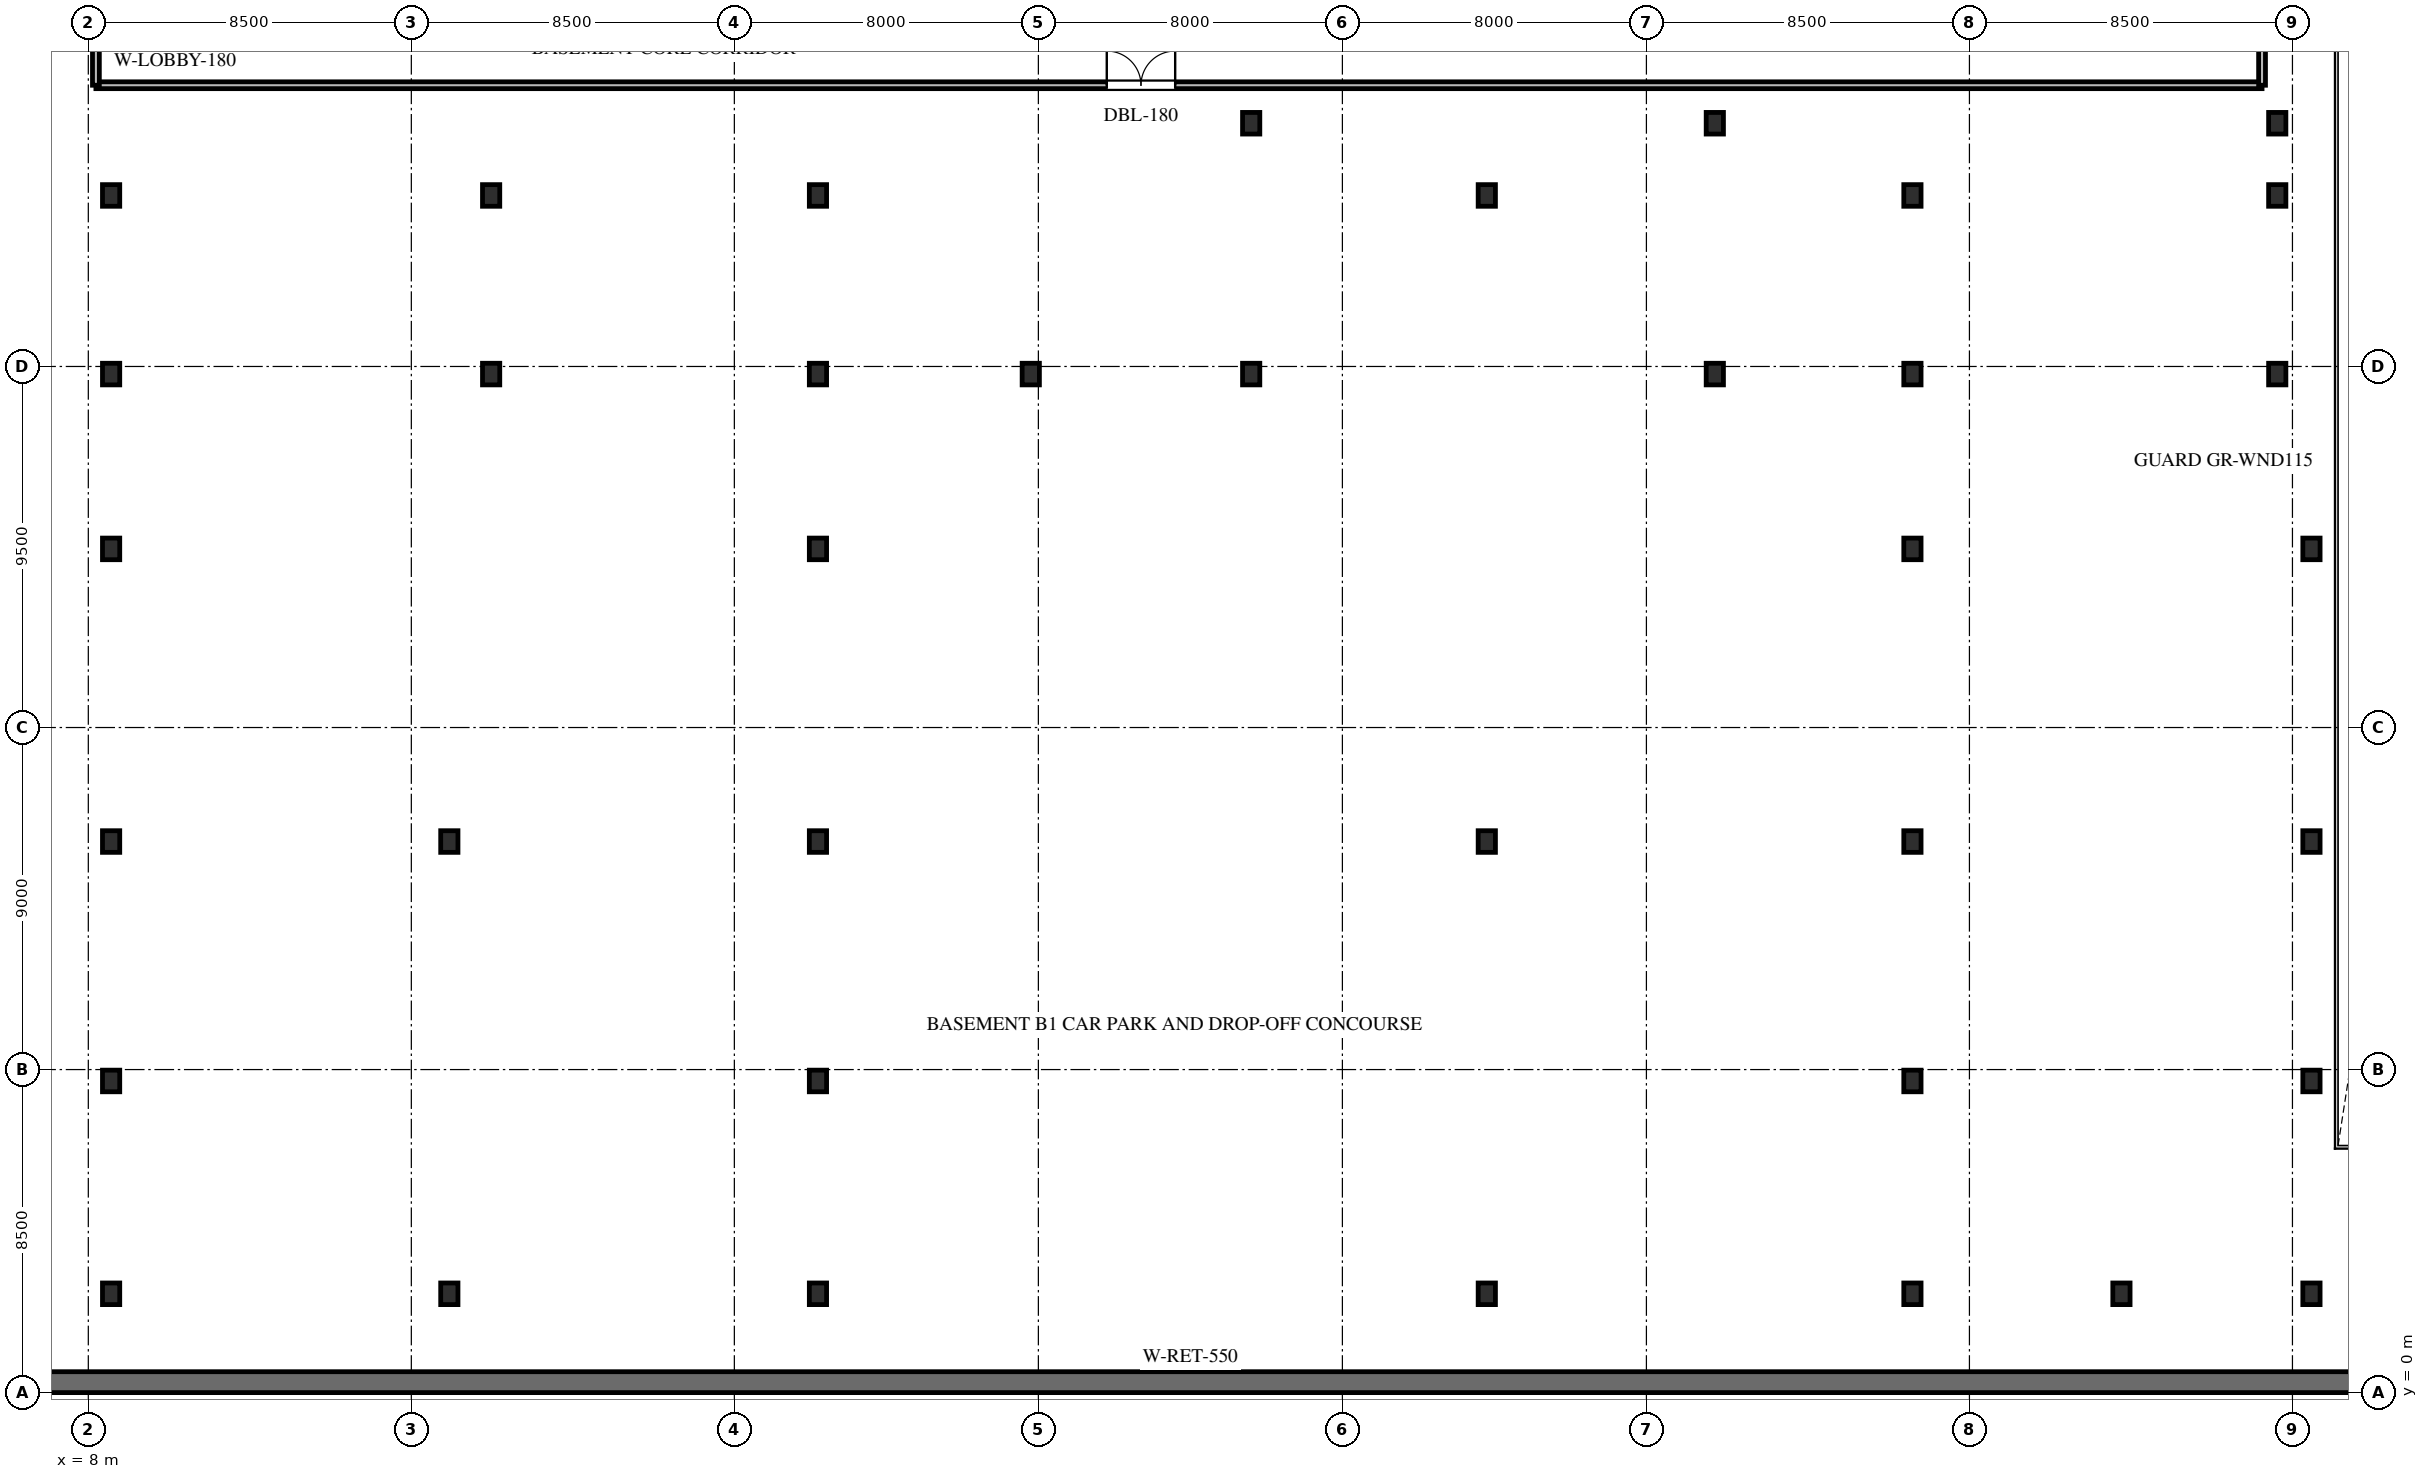
"""IFC4 building model, lengths in metres.
Left out: names, types, materials, properties, quantities, classifications, styles, units other than length and angle.
Written with IfcOpenShell. Run it as: python <this file> out.ifc"""

import sys

from ifc_helpers import new_model, si_unit, direction, frame, frame_2d, origin, origin_2d, place, context, subcontext, project, spatial, rectangle, i_section, extrude, element, fill, save


model = new_model("IFC4")
c1 = context("Model", 3, precision=1e-05, world=origin(), true_north=direction((0.0, 1.0)))
c2 = subcontext(c1, "Body", "Model", "MODEL_VIEW")
j1 = project(units=[si_unit("LENGTHUNIT", "METRE"), si_unit("PLANEANGLEUNIT", "RADIAN")], contexts=[c1])
p1 = place(None, origin())
s1 = spatial("IfcSite", under=j1, at=p1, CompositionType="ELEMENT")
p2 = place(p1, origin())
s2 = spatial("IfcBuilding", under=s1, at=p2, CompositionType="ELEMENT")
p3 = place(p2, frame((0.0, 0.0, -4.2)))
s3 = spatial("IfcBuildingStorey", under=s2, at=p3, CompositionType="ELEMENT", Elevation=-4.2)
p4 = place(p3, frame((0.0, 0.275, 0.0), z_axis=(0.0, 0.0, 1.0), x_axis=(1.0, 0.0, 0.0)))
e1 = element("IfcWall", 1, at=p4, inside=s3, PredefinedType="SOLIDWALL", context=c2, shape_type="SweptSolid", body=[
    extrude(rectangle(XDim=74.0, YDim=0.55, at=frame_2d((37.0, 0.0))), origin(), (0.0, 0.0, 1.0), 4.2),
])
for number, where, z_axis, x_axis in (
    (2, (8.6, 2.6, 0.0), (0.0, 0.0, 1.0), (1.0, 0.0, 0.0)),
    (3, (17.5, 2.6, 0.0), (0.0, 0.0, 1.0), (1.0, 0.0, 0.0)),
    (4, (27.2, 2.6, 0.0), (0.0, 0.0, 1.0), (1.0, 0.0, 0.0)),
    (5, (44.8, 2.6, 0.0), (0.0, 0.0, 1.0), (1.0, 0.0, 0.0)),
    (6, (56.0, 2.6, 0.0), (0.0, 0.0, 1.0), (1.0, 0.0, 0.0)),
    (7, (61.5, 2.6, 0.0), (0.0, 0.0, 1.0), (1.0, 0.0, 0.0)),
    (8, (66.5, 2.6, 0.0), (0.0, 0.0, 1.0), (1.0, 0.0, 0.0)),
    (9, (8.6, 8.2, 0.0), (0.0, 0.0, 1.0), (1.0, 0.0, 0.0)),
    (10, (27.2, 8.2, 0.0), (0.0, 0.0, 1.0), (1.0, 0.0, 0.0)),
    (11, (56.0, 8.2, 0.0), (0.0, 0.0, 1.0), (1.0, 0.0, 0.0)),
    (12, (66.5, 8.2, 0.0), (0.0, 0.0, 1.0), (1.0, 0.0, 0.0)),
    (13, (8.6, 14.5, 0.0), (0.0, 0.0, 1.0), (1.0, 0.0, 0.0)),
    (14, (17.5, 14.5, 0.0), (0.0, 0.0, 1.0), (1.0, 0.0, 0.0)),
    (15, (27.2, 14.5, 0.0), (0.0, 0.0, 1.0), (1.0, 0.0, 0.0)),
    (16, (44.8, 14.5, 0.0), (0.0, 0.0, 1.0), (1.0, 0.0, 0.0)),
    (17, (56.0, 14.5, 0.0), (0.0, 0.0, 1.0), (1.0, 0.0, 0.0)),
    (18, (66.5, 14.5, 0.0), (0.0, 0.0, 1.0), (1.0, 0.0, 0.0)),
    (19, (8.6, 22.2, 0.0), (0.0, 0.0, 1.0), (1.0, 0.0, 0.0)),
    (20, (27.2, 22.2, 0.0), (0.0, 0.0, 1.0), (1.0, 0.0, 0.0)),
    (21, (56.0, 22.2, 0.0), (0.0, 0.0, 1.0), (1.0, 0.0, 0.0)),
    (22, (66.5, 22.2, 0.0), (0.0, 0.0, 1.0), (1.0, 0.0, 0.0)),
    (23, (8.6, 26.8, 0.0), (0.0, 0.0, 1.0), (1.0, 0.0, 0.0)),
    (24, (18.6, 26.8, 0.0), (0.0, 0.0, 1.0), (1.0, 0.0, 0.0)),
    (25, (27.2, 26.8, 0.0), (0.0, 0.0, 1.0), (1.0, 0.0, 0.0)),
    (26, (32.8, 26.8, 0.0), (0.0, 0.0, 1.0), (1.0, 0.0, 0.0)),
    (27, (38.6, 26.8, 0.0), (0.0, 0.0, 1.0), (1.0, 0.0, 0.0)),
    (28, (50.8, 26.8, 0.0), (0.0, 0.0, 1.0), (1.0, 0.0, 0.0)),
    (29, (56.0, 26.8, 0.0), (0.0, 0.0, 1.0), (1.0, 0.0, 0.0)),
    (30, (65.6, 26.8, 0.0), (0.0, 0.0, 1.0), (1.0, 0.0, 0.0)),
    (31, (8.6, 31.5, 0.0), (0.0, 0.0, 1.0), (1.0, 0.0, 0.0)),
    (32, (18.6, 31.5, 0.0), (0.0, 0.0, 1.0), (1.0, 0.0, 0.0)),
    (33, (27.2, 31.5, 0.0), (0.0, 0.0, 1.0), (1.0, 0.0, 0.0)),
    (34, (44.8, 31.5, 0.0), (0.0, 0.0, 1.0), (1.0, 0.0, 0.0)),
    (35, (56.0, 31.5, 0.0), (0.0, 0.0, 1.0), (1.0, 0.0, 0.0)),
    (36, (65.6, 31.5, 0.0), (0.0, 0.0, 1.0), (1.0, 0.0, 0.0)),
    (37, (38.6, 33.4, 0.0), (0.0, 0.0, 1.0), (1.0, 0.0, 0.0)),
    (38, (50.8, 33.4, 0.0), (0.0, 0.0, 1.0), (1.0, 0.0, 0.0)),
    (39, (65.6, 33.4, 0.0), (0.0, 0.0, 1.0), (1.0, 0.0, 0.0)),
):
    element("IfcColumn", number, at=place(p3, frame(where, z_axis=z_axis, x_axis=x_axis)), inside=s3, PredefinedType="COLUMN", context=c2, shape_type="SweptSolid", body=[
        extrude(i_section(OverallWidth=0.454, OverallDepth=0.569, WebThickness=0.078, FlangeThickness=0.125, FilletRadius=0.03, at=origin_2d()), origin(), (0.0, 0.0, 1.0), 4.2),
    ])
p5 = place(p3, frame((8.2, 34.4, 0.0), z_axis=(0.0, 0.0, 1.0), x_axis=(1.0, 0.0, 0.0)))
e40 = element("IfcWall", 40, at=p5, inside=s3, PredefinedType="STANDARD", context=c2, shape_type="SweptSolid", body=[
    extrude(rectangle(XDim=57.0, YDim=0.18, at=frame_2d((28.5, 0.0))), origin(), (0.0, 0.0, 1.0), 2.902),
])
p6 = place(p5, frame((26.6, 0.0, 0.0)))
e41 = element("IfcOpeningElement", 41, at=p6, cuts=e40, PredefinedType="OPENING", context=c2, shape_type="SweptSolid", body=[
    extrude(rectangle(XDim=1.8, YDim=2.2, at=frame_2d((0.9, 1.1))), frame((0.0, 0.1, 0.0), z_axis=(0.0, -1.0, 0.0), x_axis=(1.0, 0.0, 0.0)), (0.0, 0.0, 1.0), 0.2),
])
p7 = place(p3, frame((8.2, 34.4, 0.0), z_axis=(0.0, 0.0, 1.0), x_axis=(0.0, 1.0, 0.0)))
e42 = element("IfcWall", 42, at=p7, inside=s3, PredefinedType="STANDARD", context=c2, shape_type="SweptSolid", body=[
    extrude(rectangle(XDim=3.65, YDim=0.18, at=frame_2d((1.825, 0.0))), origin(), (0.0, 0.0, 1.0), 3.85),
])
p8 = place(p3, frame((65.2, 34.4, 0.0), z_axis=(0.0, 0.0, 1.0), x_axis=(0.0, 1.0, 0.0)))
e43 = element("IfcWall", 43, at=p8, inside=s3, PredefinedType="STANDARD", context=c2, shape_type="SweptSolid", body=[
    extrude(rectangle(XDim=3.167, YDim=0.18, at=frame_2d((1.583, 0.0))), origin(), (0.0, 0.0, 1.0), 2.902),
])
p9 = place(p6, origin())
e44 = element("IfcDoor", 44, at=p9, inside=s3, OperationType="DOUBLE_DOOR_SINGLE_SWING", PredefinedType="DOOR", context=c2, shape_type="SweptSolid", body=[
    extrude(rectangle(XDim=1.8, YDim=2.2, at=frame_2d((0.9, 1.1))), frame((0.0, 0.025, 0.0), z_axis=(0.0, -1.0, 0.0), x_axis=(1.0, 0.0, 0.0)), (0.0, 0.0, 1.0), 0.05),
])
fill(e41, e44)
save(model, sys.argv[1])
